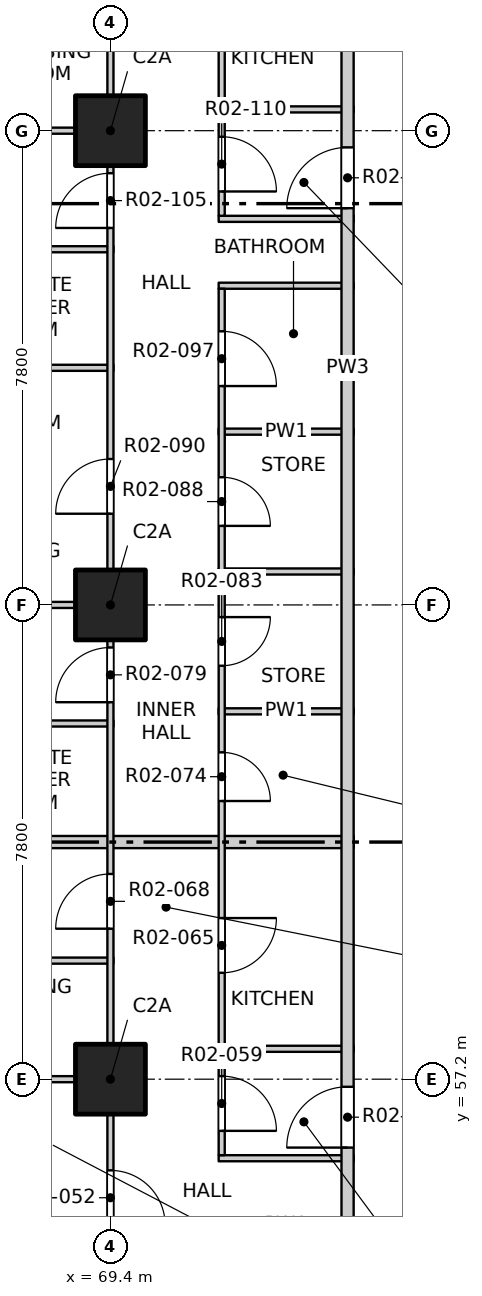
"""IFC4 building model, lengths in metres.
Left out: names, types, materials, properties, quantities, classifications, styles, units other than length and angle.
Written with IfcOpenShell. Run it as: python <this file> out.ifc"""

import sys

from ifc_helpers import new_model, si_unit, direction, frame, frame_2d, origin, origin_2d, place, context, subcontext, project, spatial, rectangle, extrude, element, fill, save


model = new_model("IFC4")
c1 = context("Model", 3, precision=1e-05, world=origin(), true_north=direction((0.0, 1.0)))
c2 = subcontext(c1, "Body", "Model", "MODEL_VIEW")
j1 = project(units=[si_unit("LENGTHUNIT", "METRE"), si_unit("PLANEANGLEUNIT", "RADIAN")], contexts=[c1])
p1 = place(None, origin())
s1 = spatial("IfcSite", under=j1, at=p1, CompositionType="ELEMENT")
p2 = place(p1, origin())
s2 = spatial("IfcBuilding", under=s1, at=p2, CompositionType="ELEMENT")
p3 = place(p2, frame((0.0, 0.0, 36.5)))
s3 = spatial("IfcBuildingStorey", under=s2, at=p3, CompositionType="ELEMENT", Elevation=36.5)
for number, where, z_axis, x_axis in (
    (1, (69.4, 57.2, -0.25), (0.0, 0.0, 1.0), (1.0, 0.0, 0.0)),
    (2, (69.4, 65.0, -0.25), (0.0, 0.0, 1.0), (1.0, 0.0, 0.0)),
    (3, (69.4, 72.8, -0.25), (0.0, 0.0, 1.0), (1.0, 0.0, 0.0)),
):
    element("IfcColumn", number, at=place(p3, frame(where, z_axis=z_axis, x_axis=x_axis)), inside=s3, PredefinedType="COLUMN", context=c2, shape_type="SweptSolid", body=[
        extrude(rectangle(XDim=1.15, YDim=1.15, at=origin_2d()), origin(), (0.0, 0.0, 1.0), 3.4),
    ])
p4 = place(p3, frame((71.18, 55.9, 0.0), z_axis=(0.0, 0.0, 1.0), x_axis=(1.0, 0.0, 0.0)))
e4 = element("IfcWall", 4, at=p4, inside=s3, PredefinedType="PARTITIONING", context=c2, shape_type="SweptSolid", body=[
    extrude(rectangle(XDim=2.22, YDim=0.1, at=frame_2d((1.11, 0.0))), origin(), (0.0, 0.0, 1.0), 3.15),
])
p5 = place(p3, frame((61.9, 57.2, 0.0), z_axis=(0.0, 0.0, 1.0), x_axis=(1.0, 0.0, 0.0)))
e5 = element("IfcWall", 5, at=p5, inside=s3, PredefinedType="PARTITIONING", context=c2, shape_type="SweptSolid", body=[
    extrude(rectangle(XDim=7.55, YDim=0.1, at=frame_2d((3.775, 0.0))), origin(), (0.0, 0.0, 1.0), 2.55),
])
p6 = place(p3, frame((71.18, 57.7, 0.0), z_axis=(0.0, 0.0, 1.0), x_axis=(1.0, 0.0, 0.0)))
e6 = element("IfcWall", 6, at=p6, inside=s3, PredefinedType="PARTITIONING", context=c2, shape_type="SweptSolid", body=[
    extrude(rectangle(XDim=2.22, YDim=0.1, at=frame_2d((1.11, 0.0))), origin(), (0.0, 0.0, 1.0), 3.15),
])
p7 = place(p3, frame((66.05, 59.15, 0.0), z_axis=(0.0, 0.0, 1.0), x_axis=(1.0, 0.0, 0.0)))
e7 = element("IfcWall", 7, at=p7, inside=s3, PredefinedType="PARTITIONING", context=c2, shape_type="SweptSolid", body=[
    extrude(rectangle(XDim=3.4, YDim=0.1, at=frame_2d((1.7, 0.0))), origin(), (0.0, 0.0, 1.0), 3.15),
])
p8 = place(p3, frame((61.9, 61.1, 0.0), z_axis=(0.0, 0.0, 1.0), x_axis=(1.0, 0.0, 0.0)))
e8 = element("IfcWall", 8, at=p8, inside=s3, PredefinedType="PARTITIONING", context=c2, shape_type="SweptSolid", body=[
    extrude(rectangle(XDim=11.5, YDim=0.2, at=frame_2d((5.75, 0.0))), origin(), (0.0, 0.0, 1.0), 3.15),
])
p9 = place(p3, frame((66.05, 63.05, 0.0), z_axis=(0.0, 0.0, 1.0), x_axis=(1.0, 0.0, 0.0)))
e9 = element("IfcWall", 9, at=p9, inside=s3, PredefinedType="PARTITIONING", context=c2, shape_type="SweptSolid", body=[
    extrude(rectangle(XDim=3.4, YDim=0.1, at=frame_2d((1.7, 0.0))), origin(), (0.0, 0.0, 1.0), 3.15),
])
p10 = place(p3, frame((71.18, 63.25, 0.0), z_axis=(0.0, 0.0, 1.0), x_axis=(1.0, 0.0, 0.0)))
e10 = element("IfcWall", 10, at=p10, inside=s3, PredefinedType="PARTITIONING", context=c2, shape_type="SweptSolid", body=[
    extrude(rectangle(XDim=2.22, YDim=0.1, at=frame_2d((1.11, 0.0))), origin(), (0.0, 0.0, 1.0), 3.15),
])
p11 = place(p3, frame((61.9, 65.0, 0.0), z_axis=(0.0, 0.0, 1.0), x_axis=(1.0, 0.0, 0.0)))
e11 = element("IfcWall", 11, at=p11, inside=s3, PredefinedType="PARTITIONING", context=c2, shape_type="SweptSolid", body=[
    extrude(rectangle(XDim=7.55, YDim=0.1, at=frame_2d((3.775, 0.0))), origin(), (0.0, 0.0, 1.0), 2.55),
])
for number, where, z_axis, x_axis in (
    (12, (71.18, 65.55, 0.0), (0.0, 0.0, 1.0), (1.0, 0.0, 0.0)),
    (13, (71.18, 67.85, 0.0), (0.0, 0.0, 1.0), (1.0, 0.0, 0.0)),
):
    element("IfcWall", number, at=place(p3, frame(where, z_axis=z_axis, x_axis=x_axis)), inside=s3, PredefinedType="PARTITIONING", context=c2, shape_type="SweptSolid", body=[
        extrude(rectangle(XDim=2.22, YDim=0.1, at=frame_2d((1.11, 0.0))), origin(), (0.0, 0.0, 1.0), 3.15),
    ])
p12 = place(p3, frame((61.9, 68.9, 0.0), z_axis=(0.0, 0.0, 1.0), x_axis=(1.0, 0.0, 0.0)))
e14 = element("IfcWall", 14, at=p12, inside=s3, PredefinedType="PARTITIONING", context=c2, shape_type="SweptSolid", body=[
    extrude(rectangle(XDim=7.55, YDim=0.1, at=frame_2d((3.775, 0.0))), origin(), (0.0, 0.0, 1.0), 3.15),
])
p13 = place(p3, frame((71.18, 70.25, 0.0), z_axis=(0.0, 0.0, 1.0), x_axis=(1.0, 0.0, 0.0)))
e15 = element("IfcWall", 15, at=p13, inside=s3, PredefinedType="PARTITIONING", context=c2, shape_type="SweptSolid", body=[
    extrude(rectangle(XDim=2.22, YDim=0.1, at=frame_2d((1.11, 0.0))), origin(), (0.0, 0.0, 1.0), 3.15),
])
p14 = place(p3, frame((66.05, 70.85, 0.0), z_axis=(0.0, 0.0, 1.0), x_axis=(1.0, 0.0, 0.0)))
e16 = element("IfcWall", 16, at=p14, inside=s3, PredefinedType="PARTITIONING", context=c2, shape_type="SweptSolid", body=[
    extrude(rectangle(XDim=3.4, YDim=0.1, at=frame_2d((1.7, 0.0))), origin(), (0.0, 0.0, 1.0), 3.15),
])
p15 = place(p3, frame((71.18, 71.35, 0.0), z_axis=(0.0, 0.0, 1.0), x_axis=(1.0, 0.0, 0.0)))
e17 = element("IfcWall", 17, at=p15, inside=s3, PredefinedType="PARTITIONING", context=c2, shape_type="SweptSolid", body=[
    extrude(rectangle(XDim=2.22, YDim=0.1, at=frame_2d((1.11, 0.0))), origin(), (0.0, 0.0, 1.0), 3.15),
])
p16 = place(p3, frame((61.9, 72.8, 0.0), z_axis=(0.0, 0.0, 1.0), x_axis=(1.0, 0.0, 0.0)))
e18 = element("IfcWall", 18, at=p16, inside=s3, PredefinedType="PARTITIONING", context=c2, shape_type="SweptSolid", body=[
    extrude(rectangle(XDim=7.55, YDim=0.1, at=frame_2d((3.775, 0.0))), origin(), (0.0, 0.0, 1.0), 2.55),
])
p17 = place(p3, frame((71.18, 73.15, 0.0), z_axis=(0.0, 0.0, 1.0), x_axis=(1.0, 0.0, 0.0)))
e19 = element("IfcWall", 19, at=p17, inside=s3, PredefinedType="PARTITIONING", context=c2, shape_type="SweptSolid", body=[
    extrude(rectangle(XDim=2.22, YDim=0.1, at=frame_2d((1.11, 0.0))), origin(), (0.0, 0.0, 1.0), 3.15),
])
p18 = place(p3, frame((69.4, 41.9, 0.0), z_axis=(0.0, 0.0, 1.0), x_axis=(0.0, 1.0, 0.0)))
e20 = element("IfcWall", 20, at=p18, inside=s3, PredefinedType="PARTITIONING", context=c2, shape_type="SweptSolid", body=[
    extrude(rectangle(XDim=46.2, YDim=0.1, at=frame_2d((23.1, 0.0))), origin(), (0.0, 0.0, 1.0), 3.15),
])
p19 = place(p18, frame((1.2, 0.0, 0.0)))
e21 = element("IfcOpeningElement", 21, at=p19, cuts=e20, PredefinedType="OPENING", context=c2, shape_type="SweptSolid", body=[
    extrude(rectangle(XDim=0.9, YDim=2.1, at=frame_2d((0.45, 1.05))), frame((0.0, 0.06, 0.0), z_axis=(0.0, -1.0, 0.0), x_axis=(1.0, 0.0, 0.0)), (0.0, 0.0, 1.0), 0.12),
])
p20 = place(p18, frame((5.1, 0.0, 0.0)))
e22 = element("IfcOpeningElement", 22, at=p20, cuts=e20, PredefinedType="OPENING", context=c2, shape_type="SweptSolid", body=[
    extrude(rectangle(XDim=0.9, YDim=2.1, at=frame_2d((0.45, 1.05))), frame((0.0, 0.06, 0.0), z_axis=(0.0, -1.0, 0.0), x_axis=(1.0, 0.0, 0.0)), (0.0, 0.0, 1.0), 0.12),
])
p21 = place(p18, frame((9.975, 0.0, 0.0)))
e23 = element("IfcOpeningElement", 23, at=p21, cuts=e20, PredefinedType="OPENING", context=c2, shape_type="SweptSolid", body=[
    extrude(rectangle(XDim=0.9, YDim=2.1, at=frame_2d((0.45, 1.05))), frame((0.0, 0.06, 0.0), z_axis=(0.0, -1.0, 0.0), x_axis=(1.0, 0.0, 0.0)), (0.0, 0.0, 1.0), 0.12),
])
p22 = place(p18, frame((12.9, 0.0, 0.0)))
e24 = element("IfcOpeningElement", 24, at=p22, cuts=e20, PredefinedType="OPENING", context=c2, shape_type="SweptSolid", body=[
    extrude(rectangle(XDim=0.9, YDim=2.1, at=frame_2d((0.45, 1.05))), frame((0.0, 0.06, 0.0), z_axis=(0.0, -1.0, 0.0), x_axis=(1.0, 0.0, 0.0)), (0.0, 0.0, 1.0), 0.12),
])
p23 = place(p18, frame((17.775, 0.0, 0.0)))
e25 = element("IfcOpeningElement", 25, at=p23, cuts=e20, PredefinedType="OPENING", context=c2, shape_type="SweptSolid", body=[
    extrude(rectangle(XDim=0.9, YDim=2.1, at=frame_2d((0.45, 1.05))), frame((0.0, 0.06, 0.0), z_axis=(0.0, -1.0, 0.0), x_axis=(1.0, 0.0, 0.0)), (0.0, 0.0, 1.0), 0.12),
])
p24 = place(p18, frame((21.5, 0.0, 0.0)))
e26 = element("IfcOpeningElement", 26, at=p24, cuts=e20, PredefinedType="OPENING", context=c2, shape_type="SweptSolid", body=[
    extrude(rectangle(XDim=0.9, YDim=2.1, at=frame_2d((0.45, 1.05))), frame((0.0, 0.06, 0.0), z_axis=(0.0, -1.0, 0.0), x_axis=(1.0, 0.0, 0.0)), (0.0, 0.0, 1.0), 0.12),
])
p25 = place(p18, frame((24.6, 0.0, 0.0)))
e27 = element("IfcOpeningElement", 27, at=p25, cuts=e20, PredefinedType="OPENING", context=c2, shape_type="SweptSolid", body=[
    extrude(rectangle(XDim=0.9, YDim=2.1, at=frame_2d((0.45, 1.05))), frame((0.0, 0.06, 0.0), z_axis=(0.0, -1.0, 0.0), x_axis=(1.0, 0.0, 0.0)), (0.0, 0.0, 1.0), 0.12),
])
p26 = place(p18, frame((29.3, 0.0, 0.0)))
e28 = element("IfcOpeningElement", 28, at=p26, cuts=e20, PredefinedType="OPENING", context=c2, shape_type="SweptSolid", body=[
    extrude(rectangle(XDim=0.9, YDim=2.1, at=frame_2d((0.45, 1.05))), frame((0.0, 0.06, 0.0), z_axis=(0.0, -1.0, 0.0), x_axis=(1.0, 0.0, 0.0)), (0.0, 0.0, 1.0), 0.12),
])
p27 = place(p18, frame((33.375, 0.0, 0.0)))
e29 = element("IfcOpeningElement", 29, at=p27, cuts=e20, PredefinedType="OPENING", context=c2, shape_type="SweptSolid", body=[
    extrude(rectangle(XDim=0.9, YDim=2.1, at=frame_2d((0.45, 1.05))), frame((0.0, 0.06, 0.0), z_axis=(0.0, -1.0, 0.0), x_axis=(1.0, 0.0, 0.0)), (0.0, 0.0, 1.0), 0.12),
])
p28 = place(p18, frame((37.1, 0.0, 0.0)))
e30 = element("IfcOpeningElement", 30, at=p28, cuts=e20, PredefinedType="OPENING", context=c2, shape_type="SweptSolid", body=[
    extrude(rectangle(XDim=0.9, YDim=2.1, at=frame_2d((0.45, 1.05))), frame((0.0, 0.06, 0.0), z_axis=(0.0, -1.0, 0.0), x_axis=(1.0, 0.0, 0.0)), (0.0, 0.0, 1.0), 0.12),
])
p29 = place(p18, frame((41.175, 0.0, 0.0)))
e31 = element("IfcOpeningElement", 31, at=p29, cuts=e20, PredefinedType="OPENING", context=c2, shape_type="SweptSolid", body=[
    extrude(rectangle(XDim=0.9, YDim=2.1, at=frame_2d((0.45, 1.05))), frame((0.0, 0.06, 0.0), z_axis=(0.0, -1.0, 0.0), x_axis=(1.0, 0.0, 0.0)), (0.0, 0.0, 1.0), 0.12),
])
p30 = place(p18, frame((44.1, 0.0, 0.0)))
e32 = element("IfcOpeningElement", 32, at=p30, cuts=e20, PredefinedType="OPENING", context=c2, shape_type="SweptSolid", body=[
    extrude(rectangle(XDim=0.9, YDim=2.1, at=frame_2d((0.45, 1.05))), frame((0.0, 0.06, 0.0), z_axis=(0.0, -1.0, 0.0), x_axis=(1.0, 0.0, 0.0)), (0.0, 0.0, 1.0), 0.12),
])
p31 = place(p3, frame((71.23, 55.95, 0.0), z_axis=(0.0, 0.0, 1.0), x_axis=(0.0, 1.0, 0.0)))
e33 = element("IfcWall", 33, at=p31, inside=s3, PredefinedType="PARTITIONING", context=c2, shape_type="SweptSolid", body=[
    extrude(rectangle(XDim=14.25, YDim=0.1, at=frame_2d((7.125, 0.0))), origin(), (0.0, 0.0, 1.0), 3.15),
])
p32 = place(p31, frame((0.4, 0.0, 0.0)))
e34 = element("IfcOpeningElement", 34, at=p32, cuts=e33, PredefinedType="OPENING", context=c2, shape_type="SweptSolid", body=[
    extrude(rectangle(XDim=0.9, YDim=2.1, at=frame_2d((0.45, 1.05))), frame((0.0, 0.06, 0.0), z_axis=(0.0, -1.0, 0.0), x_axis=(1.0, 0.0, 0.0)), (0.0, 0.0, 1.0), 0.12),
])
p33 = place(p31, frame((3.0, 0.0, 0.0)))
e35 = element("IfcOpeningElement", 35, at=p33, cuts=e33, PredefinedType="OPENING", context=c2, shape_type="SweptSolid", body=[
    extrude(rectangle(XDim=0.9, YDim=2.1, at=frame_2d((0.45, 1.05))), frame((0.0, 0.06, 0.0), z_axis=(0.0, -1.0, 0.0), x_axis=(1.0, 0.0, 0.0)), (0.0, 0.0, 1.0), 0.12),
])
p34 = place(p31, frame((5.825, 0.0, 0.0)))
e36 = element("IfcOpeningElement", 36, at=p34, cuts=e33, PredefinedType="OPENING", context=c2, shape_type="SweptSolid", body=[
    extrude(rectangle(XDim=0.8, YDim=2.1, at=frame_2d((0.4, 1.05))), frame((0.0, 0.06, 0.0), z_axis=(0.0, -1.0, 0.0), x_axis=(1.0, 0.0, 0.0)), (0.0, 0.0, 1.0), 0.12),
])
p35 = place(p31, frame((8.05, 0.0, 0.0)))
e37 = element("IfcOpeningElement", 37, at=p35, cuts=e33, PredefinedType="OPENING", context=c2, shape_type="SweptSolid", body=[
    extrude(rectangle(XDim=0.8, YDim=2.1, at=frame_2d((0.4, 1.05))), frame((0.0, 0.06, 0.0), z_axis=(0.0, -1.0, 0.0), x_axis=(1.0, 0.0, 0.0)), (0.0, 0.0, 1.0), 0.12),
])
p36 = place(p31, frame((10.35, 0.0, 0.0)))
e38 = element("IfcOpeningElement", 38, at=p36, cuts=e33, PredefinedType="OPENING", context=c2, shape_type="SweptSolid", body=[
    extrude(rectangle(XDim=0.8, YDim=2.1, at=frame_2d((0.4, 1.05))), frame((0.0, 0.06, 0.0), z_axis=(0.0, -1.0, 0.0), x_axis=(1.0, 0.0, 0.0)), (0.0, 0.0, 1.0), 0.12),
])
p37 = place(p31, frame((12.65, 0.0, 0.0)))
e39 = element("IfcOpeningElement", 39, at=p37, cuts=e33, PredefinedType="OPENING", context=c2, shape_type="SweptSolid", body=[
    extrude(rectangle(XDim=0.9, YDim=2.1, at=frame_2d((0.45, 1.05))), frame((0.0, 0.06, 0.0), z_axis=(0.0, -1.0, 0.0), x_axis=(1.0, 0.0, 0.0)), (0.0, 0.0, 1.0), 0.12),
])
p38 = place(p3, frame((71.23, 71.4, 0.0), z_axis=(0.0, 0.0, 1.0), x_axis=(0.0, 1.0, 0.0)))
e40 = element("IfcWall", 40, at=p38, inside=s3, PredefinedType="PARTITIONING", context=c2, shape_type="SweptSolid", body=[
    extrude(rectangle(XDim=6.7, YDim=0.1, at=frame_2d((3.35, 0.0))), origin(), (0.0, 0.0, 1.0), 3.15),
])
p39 = place(p38, frame((0.4, 0.0, 0.0)))
e41 = element("IfcOpeningElement", 41, at=p39, cuts=e40, PredefinedType="OPENING", context=c2, shape_type="SweptSolid", body=[
    extrude(rectangle(XDim=0.9, YDim=2.1, at=frame_2d((0.45, 1.05))), frame((0.0, 0.06, 0.0), z_axis=(0.0, -1.0, 0.0), x_axis=(1.0, 0.0, 0.0)), (0.0, 0.0, 1.0), 0.12),
])
p40 = place(p38, frame((3.075, 0.0, 0.0)))
e42 = element("IfcOpeningElement", 42, at=p40, cuts=e40, PredefinedType="OPENING", context=c2, shape_type="SweptSolid", body=[
    extrude(rectangle(XDim=0.9, YDim=2.1, at=frame_2d((0.45, 1.05))), frame((0.0, 0.06, 0.0), z_axis=(0.0, -1.0, 0.0), x_axis=(1.0, 0.0, 0.0)), (0.0, 0.0, 1.0), 0.12),
])
p41 = place(p38, frame((5.575, 0.0, 0.0)))
e43 = element("IfcOpeningElement", 43, at=p41, cuts=e40, PredefinedType="OPENING", context=c2, shape_type="SweptSolid", body=[
    extrude(rectangle(XDim=0.9, YDim=2.1, at=frame_2d((0.45, 1.05))), frame((0.0, 0.06, 0.0), z_axis=(0.0, -1.0, 0.0), x_axis=(1.0, 0.0, 0.0)), (0.0, 0.0, 1.0), 0.12),
])
p42 = place(p3, frame((73.3, 53.4, 0.0), z_axis=(0.0, 0.0, 1.0), x_axis=(0.0, 1.0, 0.0)))
e44 = element("IfcWall", 44, at=p42, inside=s3, PredefinedType="PARTITIONING", context=c2, shape_type="SweptSolid", body=[
    extrude(rectangle(XDim=31.0, YDim=0.2, at=frame_2d((15.5, 0.0))), origin(), (0.0, 0.0, 1.0), 3.15),
])
p43 = place(p42, frame((2.675, 0.0, 0.0)))
e45 = element("IfcOpeningElement", 45, at=p43, cuts=e44, PredefinedType="OPENING", context=c2, shape_type="SweptSolid", body=[
    extrude(rectangle(XDim=1.0, YDim=2.1, at=frame_2d((0.5, 1.05))), frame((0.0, 0.11, 0.0), z_axis=(0.0, -1.0, 0.0), x_axis=(1.0, 0.0, 0.0)), (0.0, 0.0, 1.0), 0.22),
])
p44 = place(p42, frame((18.125, 0.0, 0.0)))
e46 = element("IfcOpeningElement", 46, at=p44, cuts=e44, PredefinedType="OPENING", context=c2, shape_type="SweptSolid", body=[
    extrude(rectangle(XDim=1.0, YDim=2.1, at=frame_2d((0.5, 1.05))), frame((0.0, 0.11, 0.0), z_axis=(0.0, -1.0, 0.0), x_axis=(1.0, 0.0, 0.0)), (0.0, 0.0, 1.0), 0.22),
])
p45 = place(p42, frame((26.025, 0.0, 0.0)))
e47 = element("IfcOpeningElement", 47, at=p45, cuts=e44, PredefinedType="OPENING", context=c2, shape_type="SweptSolid", body=[
    extrude(rectangle(XDim=1.0, YDim=2.1, at=frame_2d((0.5, 1.05))), frame((0.0, 0.11, 0.0), z_axis=(0.0, -1.0, 0.0), x_axis=(1.0, 0.0, 0.0)), (0.0, 0.0, 1.0), 0.22),
])
p46 = place(p22, origin())
e48 = element("IfcDoor", 48, at=p46, inside=s3, OperationType="SINGLE_SWING_RIGHT", PredefinedType="DOOR", context=c2, shape_type="SweptSolid", body=[
    extrude(rectangle(XDim=0.9, YDim=2.1, at=frame_2d((0.45, 1.05))), frame((0.0, 0.025, 0.0), z_axis=(0.0, -1.0, 0.0), x_axis=(1.0, 0.0, 0.0)), (0.0, 0.0, 1.0), 0.05),
])
fill(e24, e48)
p47 = place(p43, origin())
e49 = element("IfcDoor", 49, at=p47, inside=s3, OperationType="SINGLE_SWING_RIGHT", PredefinedType="DOOR", context=c2, shape_type="SweptSolid", body=[
    extrude(rectangle(XDim=1.0, YDim=2.1, at=frame_2d((0.5, 1.05))), frame((0.0, 0.025, 0.0), z_axis=(0.0, -1.0, 0.0), x_axis=(1.0, 0.0, 0.0)), (0.0, 0.0, 1.0), 0.05),
])
fill(e45, e49)
p48 = place(p32, origin())
e50 = element("IfcDoor", 50, at=p48, inside=s3, OperationType="SINGLE_SWING_RIGHT", PredefinedType="DOOR", context=c2, shape_type="SweptSolid", body=[
    extrude(rectangle(XDim=0.9, YDim=2.1, at=frame_2d((0.45, 1.05))), frame((0.0, 0.025, 0.0), z_axis=(0.0, -1.0, 0.0), x_axis=(1.0, 0.0, 0.0)), (0.0, 0.0, 1.0), 0.05),
])
fill(e34, e50)
p49 = place(p33, origin())
e51 = element("IfcDoor", 51, at=p49, inside=s3, OperationType="SINGLE_SWING_LEFT", PredefinedType="DOOR", context=c2, shape_type="SweptSolid", body=[
    extrude(rectangle(XDim=0.9, YDim=2.1, at=frame_2d((0.45, 1.05))), frame((0.0, 0.025, 0.0), z_axis=(0.0, -1.0, 0.0), x_axis=(1.0, 0.0, 0.0)), (0.0, 0.0, 1.0), 0.05),
])
fill(e35, e51)
p50 = place(p23, origin())
e52 = element("IfcDoor", 52, at=p50, inside=s3, OperationType="SINGLE_SWING_LEFT", PredefinedType="DOOR", context=c2, shape_type="SweptSolid", body=[
    extrude(rectangle(XDim=0.9, YDim=2.1, at=frame_2d((0.45, 1.05))), frame((0.0, 0.025, 0.0), z_axis=(0.0, -1.0, 0.0), x_axis=(1.0, 0.0, 0.0)), (0.0, 0.0, 1.0), 0.05),
])
fill(e25, e52)
p51 = place(p34, origin())
e53 = element("IfcDoor", 53, at=p51, inside=s3, OperationType="SINGLE_SWING_RIGHT", PredefinedType="DOOR", context=c2, shape_type="SweptSolid", body=[
    extrude(rectangle(XDim=0.8, YDim=2.1, at=frame_2d((0.4, 1.05))), frame((0.0, 0.025, 0.0), z_axis=(0.0, -1.0, 0.0), x_axis=(1.0, 0.0, 0.0)), (0.0, 0.0, 1.0), 0.05),
])
fill(e36, e53)
p52 = place(p24, origin())
e54 = element("IfcDoor", 54, at=p52, inside=s3, OperationType="SINGLE_SWING_LEFT", PredefinedType="DOOR", context=c2, shape_type="SweptSolid", body=[
    extrude(rectangle(XDim=0.9, YDim=2.1, at=frame_2d((0.45, 1.05))), frame((0.0, 0.025, 0.0), z_axis=(0.0, -1.0, 0.0), x_axis=(1.0, 0.0, 0.0)), (0.0, 0.0, 1.0), 0.05),
])
fill(e26, e54)
p53 = place(p35, origin())
e55 = element("IfcDoor", 55, at=p53, inside=s3, OperationType="SINGLE_SWING_LEFT", PredefinedType="DOOR", context=c2, shape_type="SweptSolid", body=[
    extrude(rectangle(XDim=0.8, YDim=2.1, at=frame_2d((0.4, 1.05))), frame((0.0, 0.025, 0.0), z_axis=(0.0, -1.0, 0.0), x_axis=(1.0, 0.0, 0.0)), (0.0, 0.0, 1.0), 0.05),
])
fill(e37, e55)
p54 = place(p36, origin())
e56 = element("IfcDoor", 56, at=p54, inside=s3, OperationType="SINGLE_SWING_RIGHT", PredefinedType="DOOR", context=c2, shape_type="SweptSolid", body=[
    extrude(rectangle(XDim=0.8, YDim=2.1, at=frame_2d((0.4, 1.05))), frame((0.0, 0.025, 0.0), z_axis=(0.0, -1.0, 0.0), x_axis=(1.0, 0.0, 0.0)), (0.0, 0.0, 1.0), 0.05),
])
fill(e38, e56)
p55 = place(p25, origin())
e57 = element("IfcDoor", 57, at=p55, inside=s3, OperationType="SINGLE_SWING_LEFT", PredefinedType="DOOR", context=c2, shape_type="SweptSolid", body=[
    extrude(rectangle(XDim=0.9, YDim=2.1, at=frame_2d((0.45, 1.05))), frame((0.0, 0.025, 0.0), z_axis=(0.0, -1.0, 0.0), x_axis=(1.0, 0.0, 0.0)), (0.0, 0.0, 1.0), 0.05),
])
fill(e27, e57)
p56 = place(p37, origin())
e58 = element("IfcDoor", 58, at=p56, inside=s3, OperationType="SINGLE_SWING_RIGHT", PredefinedType="DOOR", context=c2, shape_type="SweptSolid", body=[
    extrude(rectangle(XDim=0.9, YDim=2.1, at=frame_2d((0.45, 1.05))), frame((0.0, 0.025, 0.0), z_axis=(0.0, -1.0, 0.0), x_axis=(1.0, 0.0, 0.0)), (0.0, 0.0, 1.0), 0.05),
])
fill(e39, e58)
p57 = place(p26, origin())
e59 = element("IfcDoor", 59, at=p57, inside=s3, OperationType="SINGLE_SWING_LEFT", PredefinedType="DOOR", context=c2, shape_type="SweptSolid", body=[
    extrude(rectangle(XDim=0.9, YDim=2.1, at=frame_2d((0.45, 1.05))), frame((0.0, 0.025, 0.0), z_axis=(0.0, -1.0, 0.0), x_axis=(1.0, 0.0, 0.0)), (0.0, 0.0, 1.0), 0.05),
])
fill(e28, e59)
p58 = place(p44, origin())
e60 = element("IfcDoor", 60, at=p58, inside=s3, OperationType="SINGLE_SWING_RIGHT", PredefinedType="DOOR", context=c2, shape_type="SweptSolid", body=[
    extrude(rectangle(XDim=1.0, YDim=2.1, at=frame_2d((0.5, 1.05))), frame((0.0, 0.025, 0.0), z_axis=(0.0, -1.0, 0.0), x_axis=(1.0, 0.0, 0.0)), (0.0, 0.0, 1.0), 0.05),
])
fill(e46, e60)
p59 = place(p39, origin())
e61 = element("IfcDoor", 61, at=p59, inside=s3, OperationType="SINGLE_SWING_RIGHT", PredefinedType="DOOR", context=c2, shape_type="SweptSolid", body=[
    extrude(rectangle(XDim=0.9, YDim=2.1, at=frame_2d((0.45, 1.05))), frame((0.0, 0.025, 0.0), z_axis=(0.0, -1.0, 0.0), x_axis=(1.0, 0.0, 0.0)), (0.0, 0.0, 1.0), 0.05),
])
fill(e41, e61)
save(model, sys.argv[1])
